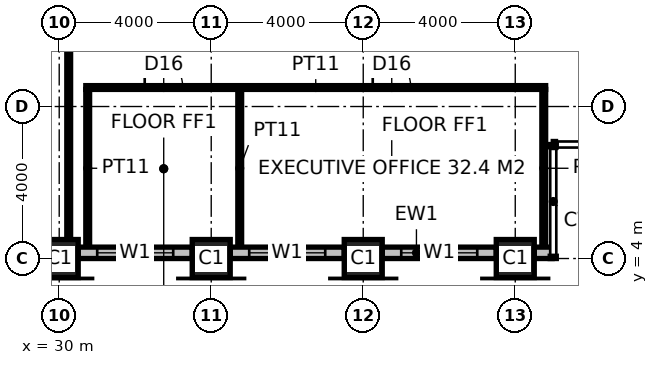
"""IFC4 building model, lengths in metres.
Left out: names, types, materials, properties, quantities, classifications, styles, units other than length and angle.
Written with IfcOpenShell. Run it as: python <this file> out.ifc"""

import sys

from ifc_helpers import new_model, si_unit, direction, frame, frame_2d, origin, origin_2d, place, context, subcontext, project, spatial, rectangle, hollow_rectangle, extrude, element, fill, save


model = new_model("IFC4")
c1 = context("Model", 3, precision=1e-05, world=origin(), true_north=direction((0.0, 1.0)))
c2 = subcontext(c1, "Body", "Model", "MODEL_VIEW")
j1 = project(units=[si_unit("LENGTHUNIT", "METRE"), si_unit("PLANEANGLEUNIT", "RADIAN")], contexts=[c1])
p1 = place(None, origin())
s1 = spatial("IfcSite", under=j1, at=p1, CompositionType="ELEMENT")
p2 = place(p1, origin())
s2 = spatial("IfcBuilding", under=s1, at=p2, CompositionType="ELEMENT")
p3 = place(p2, frame((0.0, 0.0, 274.2)))
s3 = spatial("IfcBuildingStorey", under=s2, at=p3, CompositionType="ELEMENT", Elevation=274.2)
for number, where, z_axis, x_axis in (
    (1, (30.0, 4.0, 0.0), (0.0, 0.0, 1.0), (1.0, 0.0, 0.0)),
    (2, (34.0, 4.0, 0.0), (0.0, 0.0, 1.0), (1.0, 0.0, 0.0)),
    (3, (38.0, 4.0, 0.0), (0.0, 0.0, 1.0), (1.0, 0.0, 0.0)),
    (4, (42.0, 4.0, 0.0), (0.0, 0.0, 1.0), (1.0, 0.0, 0.0)),
):
    element("IfcColumn", number, at=place(p3, frame(where, z_axis=z_axis, x_axis=x_axis)), inside=s3, PredefinedType="COLUMN", context=c2, shape_type="SweptSolid", body=[
        extrude(hollow_rectangle(XDim=1.0, YDim=1.0, WallThickness=0.1, at=origin_2d()), origin(), (0.0, 0.0, 1.0), 4.0),
    ])
p4 = place(p3, frame((30.7, 8.5, 0.0), z_axis=(0.0, 0.0, 1.0), x_axis=(1.0, 0.0, 0.0)))
e5 = element("IfcWall", 5, at=p4, inside=s3, PredefinedType="PARTITIONING", context=c2, shape_type="SweptSolid", body=[
    extrude(rectangle(XDim=12.1, YDim=0.1, at=frame_2d((6.05, 0.0))), origin(), (0.0, 0.0, 1.0), 3.85),
])
p5 = place(p4, frame((1.55, 0.0, 0.0)))
e6 = element("IfcOpeningElement", 6, at=p5, cuts=e5, PredefinedType="OPENING", context=c2, shape_type="SweptSolid", body=[
    extrude(rectangle(XDim=1.0, YDim=2.2, at=frame_2d((0.5, 1.1))), frame((0.0, 0.06, 0.0), z_axis=(0.0, -1.0, 0.0), x_axis=(1.0, 0.0, 0.0)), (0.0, 0.0, 1.0), 0.12),
])
p6 = place(p4, frame((7.55, 0.0, 0.0)))
e7 = element("IfcOpeningElement", 7, at=p6, cuts=e5, PredefinedType="OPENING", context=c2, shape_type="SweptSolid", body=[
    extrude(rectangle(XDim=1.0, YDim=2.2, at=frame_2d((0.5, 1.1))), frame((0.0, 0.06, 0.0), z_axis=(0.0, -1.0, 0.0), x_axis=(1.0, 0.0, 0.0)), (0.0, 0.0, 1.0), 0.12),
])
for number, where, z_axis, x_axis in (
    (8, (30.75, 4.3, 0.0), (0.0, 0.0, 1.0), (0.0, 1.0, 0.0)),
    (9, (34.75, 4.3, 0.0), (0.0, 0.0, 1.0), (0.0, 1.0, 0.0)),
    (10, (42.75, 4.3, 0.0), (0.0, 0.0, 1.0), (0.0, 1.0, 0.0)),
):
    element("IfcWall", number, at=place(p3, frame(where, z_axis=z_axis, x_axis=x_axis)), inside=s3, PredefinedType="PARTITIONING", context=c2, shape_type="SweptSolid", body=[
        extrude(rectangle(XDim=4.15, YDim=0.1, at=frame_2d((2.075, 0.0))), origin(), (0.0, 0.0, 1.0), 3.85),
    ])
p7 = place(p3, frame((30.25, 15.7, 0.0), z_axis=(0.0, 0.0, 1.0), x_axis=(0.0, -1.0, 0.0)))
e11 = element("IfcWall", 11, at=p7, inside=s3, PredefinedType="PARTITIONING", context=c2, shape_type="SweptSolid", body=[
    extrude(rectangle(XDim=11.4, YDim=0.1, at=frame_2d((5.7, 0.0))), origin(), (0.0, 0.0, 1.0), 3.85),
])
p8 = place(p7, frame((5.2, 0.0, 0.0)))
e12 = element("IfcOpeningElement", 12, at=p8, cuts=e11, PredefinedType="OPENING", context=c2, shape_type="SweptSolid", body=[
    extrude(rectangle(XDim=1.0, YDim=2.2, at=frame_2d((0.5, 1.1))), frame((0.0, 0.06, 0.0), z_axis=(0.0, -1.0, 0.0), x_axis=(1.0, 0.0, 0.0)), (0.0, 0.0, 1.0), 0.12),
])
p9 = place(p3, frame((30.5, 4.15, 0.0), z_axis=(0.0, 0.0, 1.0), x_axis=(1.0, 0.0, 0.0)))
e13 = element("IfcWall", 13, at=p9, inside=s3, PredefinedType="ELEMENTEDWALL", context=c2, shape_type="SweptSolid", body=[
    extrude(rectangle(XDim=3.0, YDim=0.3, at=frame_2d((1.5, 0.0))), origin(), (0.0, 0.0, 1.0), 2.85),
])
p10 = place(p9, frame((0.5, 0.0, 0.8)))
e14 = element("IfcOpeningElement", 14, at=p10, cuts=e13, PredefinedType="OPENING", context=c2, shape_type="SweptSolid", body=[
    extrude(rectangle(XDim=2.0, YDim=2.0, at=frame_2d((1.0, 1.0))), frame((0.0, 0.16, 0.0), z_axis=(0.0, -1.0, 0.0), x_axis=(1.0, 0.0, 0.0)), (0.0, 0.0, 1.0), 0.32),
])
p11 = place(p3, frame((34.5, 4.15, 0.0), z_axis=(0.0, 0.0, 1.0), x_axis=(1.0, 0.0, 0.0)))
e15 = element("IfcWall", 15, at=p11, inside=s3, PredefinedType="ELEMENTEDWALL", context=c2, shape_type="SweptSolid", body=[
    extrude(rectangle(XDim=3.0, YDim=0.3, at=frame_2d((1.5, 0.0))), origin(), (0.0, 0.0, 1.0), 2.85),
])
p12 = place(p11, frame((0.5, 0.0, 0.8)))
e16 = element("IfcOpeningElement", 16, at=p12, cuts=e15, PredefinedType="OPENING", context=c2, shape_type="SweptSolid", body=[
    extrude(rectangle(XDim=2.0, YDim=2.0, at=frame_2d((1.0, 1.0))), frame((0.0, 0.16, 0.0), z_axis=(0.0, -1.0, 0.0), x_axis=(1.0, 0.0, 0.0)), (0.0, 0.0, 1.0), 0.32),
])
p13 = place(p3, frame((38.5, 4.15, 0.0), z_axis=(0.0, 0.0, 1.0), x_axis=(1.0, 0.0, 0.0)))
e17 = element("IfcWall", 17, at=p13, inside=s3, PredefinedType="ELEMENTEDWALL", context=c2, shape_type="SweptSolid", body=[
    extrude(rectangle(XDim=3.0, YDim=0.3, at=frame_2d((1.5, 0.0))), origin(), (0.0, 0.0, 1.0), 2.85),
])
p14 = place(p13, frame((0.5, 0.0, 0.8)))
e18 = element("IfcOpeningElement", 18, at=p14, cuts=e17, PredefinedType="OPENING", context=c2, shape_type="SweptSolid", body=[
    extrude(rectangle(XDim=2.0, YDim=2.0, at=frame_2d((1.0, 1.0))), frame((0.0, 0.16, 0.0), z_axis=(0.0, -1.0, 0.0), x_axis=(1.0, 0.0, 0.0)), (0.0, 0.0, 1.0), 0.32),
])
p15 = place(p3, frame((42.5, 4.15, 0.0), z_axis=(0.0, 0.0, 1.0), x_axis=(1.0, 0.0, 0.0)))
e19 = element("IfcWall", 19, at=p15, inside=s3, PredefinedType="ELEMENTEDWALL", context=c2, shape_type="SweptSolid", body=[
    extrude(rectangle(XDim=0.47, YDim=0.3, at=frame_2d((0.235, 0.0))), origin(), (0.0, 0.0, 1.0), 2.95),
])
p16 = place(p5, origin())
e20 = element("IfcDoor", 20, at=p16, inside=s3, OperationType="SINGLE_SWING_LEFT", PredefinedType="DOOR", context=c2, shape_type="SweptSolid", body=[
    extrude(rectangle(XDim=1.0, YDim=2.2, at=frame_2d((0.5, 1.1))), frame((0.0, 0.025, 0.0), z_axis=(0.0, -1.0, 0.0), x_axis=(1.0, 0.0, 0.0)), (0.0, 0.0, 1.0), 0.05),
])
fill(e6, e20)
p17 = place(p6, origin())
e21 = element("IfcDoor", 21, at=p17, inside=s3, OperationType="SINGLE_SWING_LEFT", PredefinedType="DOOR", context=c2, shape_type="SweptSolid", body=[
    extrude(rectangle(XDim=1.0, YDim=2.2, at=frame_2d((0.5, 1.1))), frame((0.0, 0.025, 0.0), z_axis=(0.0, -1.0, 0.0), x_axis=(1.0, 0.0, 0.0)), (0.0, 0.0, 1.0), 0.05),
])
fill(e7, e21)
p18 = place(p10, origin())
e22 = element("IfcWindow", 22, at=p18, inside=s3, PartitioningType="SINGLE_PANEL", PredefinedType="WINDOW", context=c2, shape_type="SweptSolid", body=[
    extrude(rectangle(XDim=2.0, YDim=2.0, at=frame_2d((1.0, 1.0))), frame((0.0, 0.03, 0.0), z_axis=(0.0, -1.0, 0.0), x_axis=(1.0, 0.0, 0.0)), (0.0, 0.0, 1.0), 0.06),
])
fill(e14, e22)
p19 = place(p12, origin())
e23 = element("IfcWindow", 23, at=p19, inside=s3, PartitioningType="SINGLE_PANEL", PredefinedType="WINDOW", context=c2, shape_type="SweptSolid", body=[
    extrude(rectangle(XDim=2.0, YDim=2.0, at=frame_2d((1.0, 1.0))), frame((0.0, 0.03, 0.0), z_axis=(0.0, -1.0, 0.0), x_axis=(1.0, 0.0, 0.0)), (0.0, 0.0, 1.0), 0.06),
])
fill(e16, e23)
p20 = place(p14, origin())
e24 = element("IfcWindow", 24, at=p20, inside=s3, PartitioningType="SINGLE_PANEL", PredefinedType="WINDOW", context=c2, shape_type="SweptSolid", body=[
    extrude(rectangle(XDim=2.0, YDim=2.0, at=frame_2d((1.0, 1.0))), frame((0.0, 0.03, 0.0), z_axis=(0.0, -1.0, 0.0), x_axis=(1.0, 0.0, 0.0)), (0.0, 0.0, 1.0), 0.06),
])
fill(e18, e24)
save(model, sys.argv[1])
